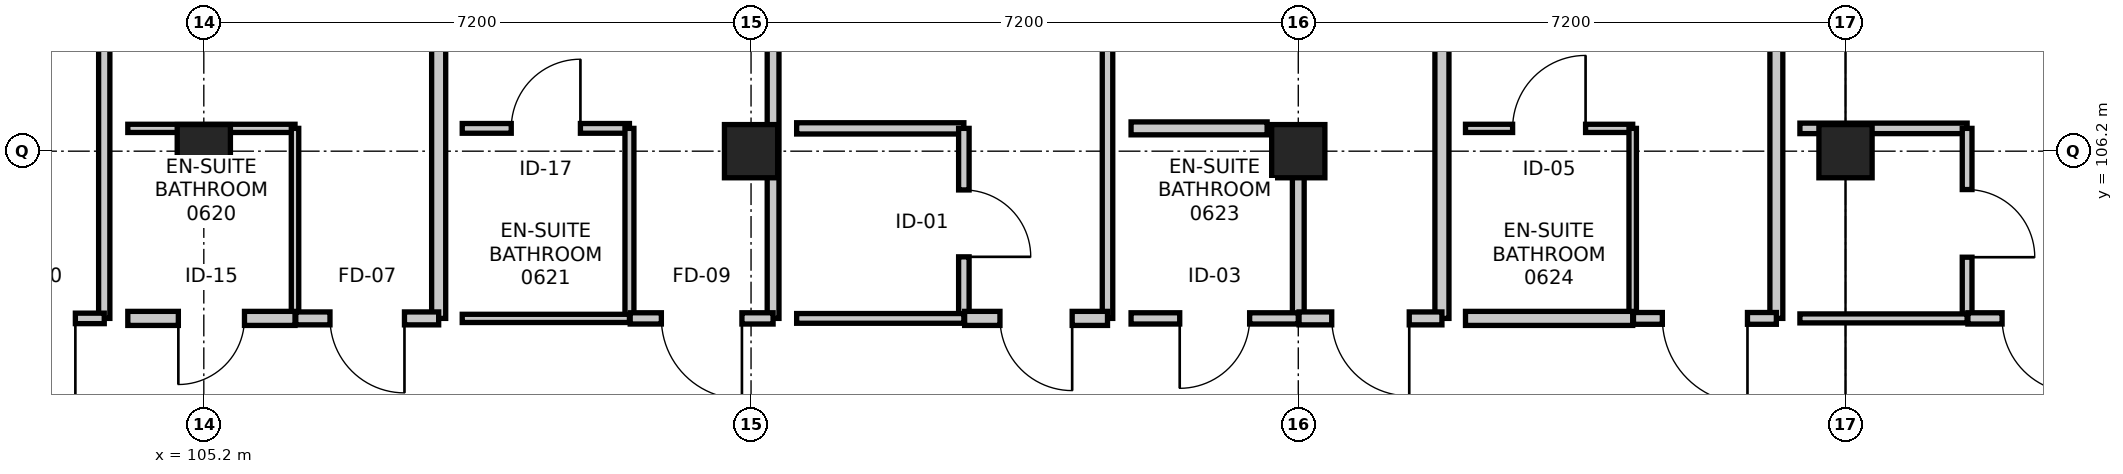
"""IFC4 building model, lengths in metres.
Left out: names, types, materials, properties, quantities, classifications, styles, units other than length and angle.
Written with IfcOpenShell. Run it as: python <this file> out.ifc"""

import sys

from ifc_helpers import new_model, si_unit, direction, frame, frame_2d, origin, origin_2d, place, context, subcontext, project, spatial, rectangle, extrude, element, fill, save


model = new_model("IFC4")
c1 = context("Model", 3, precision=1e-05, world=origin(), true_north=direction((0.0, 1.0)))
c2 = subcontext(c1, "Body", "Model", "MODEL_VIEW")
j1 = project(units=[si_unit("LENGTHUNIT", "METRE"), si_unit("PLANEANGLEUNIT", "RADIAN")], contexts=[c1])
p1 = place(None, origin())
s1 = spatial("IfcSite", under=j1, at=p1, CompositionType="ELEMENT")
p2 = place(p1, origin())
s2 = spatial("IfcBuilding", under=s1, at=p2, CompositionType="ELEMENT")
p3 = place(p2, frame((0.0, 0.0, 26.4)))
s3 = spatial("IfcBuildingStorey", under=s2, at=p3, CompositionType="ELEMENT", Elevation=26.4)
for number, where, z_axis, x_axis in (
    (1, (105.2, 106.2, 0.0), (0.0, 0.0, 1.0), (1.0, 0.0, 0.0)),
    (2, (112.4, 106.2, 0.0), (0.0, 0.0, 1.0), (1.0, 0.0, 0.0)),
    (3, (119.6, 106.2, 0.0), (0.0, 0.0, 1.0), (1.0, 0.0, 0.0)),
    (4, (126.8, 106.2, 0.0), (0.0, 0.0, 1.0), (1.0, 0.0, 0.0)),
):
    element("IfcColumn", number, at=place(p3, frame(where, z_axis=z_axis, x_axis=x_axis)), inside=s3, PredefinedType="COLUMN", context=c2, shape_type="SweptSolid", body=[
        extrude(rectangle(XDim=0.7, YDim=0.7, at=origin_2d()), origin(), (0.0, 0.0, 1.0), 3.6),
    ])
p4 = place(p3, frame((103.89, 116.101, 0.0), z_axis=(0.0, 0.0, 1.0), x_axis=(0.0, -1.0, 0.0)))
e5 = element("IfcWall", 5, at=p4, inside=s3, PredefinedType="PARTITIONING", context=c2, shape_type="SweptSolid", body=[
    extrude(rectangle(XDim=12.101, YDim=0.148, at=frame_2d((6.051, 0.0))), origin(), (0.0, 0.0, 1.0), 2.735),
])
p5 = place(p3, frame((103.89, 104.0, 0.0), z_axis=(0.0, 0.0, 1.0), x_axis=(-1.0, 0.0, 0.0)))
e6 = element("IfcWall", 6, at=p5, inside=s3, PredefinedType="PARTITIONING", context=c2, shape_type="SweptSolid", body=[
    extrude(rectangle(XDim=1.88, YDim=0.138, at=frame_2d((0.94, 0.0))), origin(), (0.0, 0.0, 1.0), 3.35),
])
p6 = place(p5, frame((0.38, 0.0, 0.0)))
e7 = element("IfcOpeningElement", 7, at=p6, cuts=e6, PredefinedType="OPENING", context=c2, shape_type="SweptSolid", body=[
    extrude(rectangle(XDim=1.12, YDim=2.2, at=frame_2d((0.56, 1.1))), frame((0.0, 0.079, 0.0), z_axis=(0.0, -1.0, 0.0), x_axis=(1.0, 0.0, 0.0)), (0.0, 0.0, 1.0), 0.158),
])
p7 = place(p3, frame((104.2, 106.5, 0.0), z_axis=(0.0, 0.0, 1.0), x_axis=(1.0, 0.0, 0.0)))
e8 = element("IfcWall", 8, at=p7, inside=s3, PredefinedType="PARTITIONING", context=c2, shape_type="SweptSolid", body=[
    extrude(rectangle(XDim=2.2, YDim=0.108, at=frame_2d((1.1, 0.0))), origin(), (0.0, 0.0, 1.0), 2.685),
])
p8 = place(p3, frame((106.4, 106.5, 0.0), z_axis=(0.0, 0.0, 1.0), x_axis=(0.0, -1.0, 0.0)))
e9 = element("IfcWall", 9, at=p8, inside=s3, PredefinedType="PARTITIONING", context=c2, shape_type="SweptSolid", body=[
    extrude(rectangle(XDim=2.5, YDim=0.098, at=frame_2d((1.25, 0.0))), origin(), (0.0, 0.0, 1.0), 2.735),
])
p9 = place(p3, frame((106.4, 104.0, 0.0), z_axis=(0.0, 0.0, 1.0), x_axis=(-1.0, 0.0, 0.0)))
e10 = element("IfcWall", 10, at=p9, inside=s3, PredefinedType="PARTITIONING", context=c2, shape_type="SweptSolid", body=[
    extrude(rectangle(XDim=2.2, YDim=0.185, at=frame_2d((1.1, 0.0))), origin(), (0.0, 0.0, 1.0), 2.685),
])
p10 = place(p9, frame((0.665, 0.0, 0.0)))
e11 = element("IfcOpeningElement", 11, at=p10, cuts=e10, PredefinedType="OPENING", context=c2, shape_type="SweptSolid", body=[
    extrude(rectangle(XDim=0.87, YDim=2.07, at=frame_2d((0.435, 1.035))), frame((0.0, 0.103, 0.0), z_axis=(0.0, -1.0, 0.0), x_axis=(1.0, 0.0, 0.0)), (0.0, 0.0, 1.0), 0.205),
])
p11 = place(p3, frame((108.29, 116.006, 0.0), z_axis=(0.0, 0.0, 1.0), x_axis=(0.0, -1.0, 0.0)))
e12 = element("IfcWall", 12, at=p11, inside=s3, PredefinedType="PARTITIONING", context=c2, shape_type="SweptSolid", body=[
    extrude(rectangle(XDim=12.006, YDim=0.185, at=frame_2d((6.003, 0.0))), origin(), (0.0, 0.0, 1.0), 2.735),
])
p12 = place(p3, frame((108.29, 104.0, 0.0), z_axis=(0.0, 0.0, 1.0), x_axis=(-1.0, 0.0, 0.0)))
e13 = element("IfcWall", 13, at=p12, inside=s3, PredefinedType="PARTITIONING", context=c2, shape_type="SweptSolid", body=[
    extrude(rectangle(XDim=1.88, YDim=0.17, at=frame_2d((0.94, 0.0))), origin(), (0.0, 0.0, 1.0), 3.35),
])
p13 = place(p12, frame((0.45, 0.0, 0.0)))
e14 = element("IfcOpeningElement", 14, at=p13, cuts=e13, PredefinedType="OPENING", context=c2, shape_type="SweptSolid", body=[
    extrude(rectangle(XDim=0.98, YDim=2.15, at=frame_2d((0.49, 1.075))), frame((0.0, 0.095, 0.0), z_axis=(0.0, -1.0, 0.0), x_axis=(1.0, 0.0, 0.0)), (0.0, 0.0, 1.0), 0.19),
])
p14 = place(p3, frame((108.6, 106.5, 0.0), z_axis=(0.0, 0.0, 1.0), x_axis=(1.0, 0.0, 0.0)))
e15 = element("IfcWall", 15, at=p14, inside=s3, PredefinedType="PARTITIONING", context=c2, shape_type="SweptSolid", body=[
    extrude(rectangle(XDim=2.2, YDim=0.128, at=frame_2d((1.1, 0.0))), origin(), (0.0, 0.0, 1.0), 3.35),
])
p15 = place(p14, frame((0.645, 0.0, 0.0)))
e16 = element("IfcOpeningElement", 16, at=p15, cuts=e15, PredefinedType="OPENING", context=c2, shape_type="SweptSolid", body=[
    extrude(rectangle(XDim=0.91, YDim=2.11, at=frame_2d((0.455, 1.055))), frame((0.0, 0.074, 0.0), z_axis=(0.0, -1.0, 0.0), x_axis=(1.0, 0.0, 0.0)), (0.0, 0.0, 1.0), 0.148),
])
p16 = place(p3, frame((110.8, 106.5, 0.0), z_axis=(0.0, 0.0, 1.0), x_axis=(0.0, -1.0, 0.0)))
e17 = element("IfcWall", 17, at=p16, inside=s3, PredefinedType="PARTITIONING", context=c2, shape_type="SweptSolid", body=[
    extrude(rectangle(XDim=2.5, YDim=0.118, at=frame_2d((1.25, 0.0))), origin(), (0.0, 0.0, 1.0), 2.735),
])
p17 = place(p3, frame((110.8, 104.0, 0.0), z_axis=(0.0, 0.0, 1.0), x_axis=(-1.0, 0.0, 0.0)))
e18 = element("IfcWall", 18, at=p17, inside=s3, PredefinedType="PARTITIONING", context=c2, shape_type="SweptSolid", body=[
    extrude(rectangle(XDim=2.2, YDim=0.108, at=frame_2d((1.1, 0.0))), origin(), (0.0, 0.0, 1.0), 3.35),
])
p18 = place(p3, frame((112.69, 115.502, 0.0), z_axis=(0.0, 0.0, 1.0), x_axis=(0.0, -1.0, 0.0)))
e19 = element("IfcWall", 19, at=p18, inside=s3, PredefinedType="PARTITIONING", context=c2, shape_type="SweptSolid", body=[
    extrude(rectangle(XDim=11.502, YDim=0.155, at=frame_2d((5.751, 0.0))), origin(), (0.0, 0.0, 1.0), 2.685),
])
p19 = place(p3, frame((112.69, 104.0, 0.0), z_axis=(0.0, 0.0, 1.0), x_axis=(-1.0, 0.0, 0.0)))
e20 = element("IfcWall", 20, at=p19, inside=s3, PredefinedType="PARTITIONING", context=c2, shape_type="SweptSolid", body=[
    extrude(rectangle(XDim=1.88, YDim=0.148, at=frame_2d((0.94, 0.0))), origin(), (0.0, 0.0, 1.0), 2.685),
])
p20 = place(p19, frame((0.41, 0.0, 0.0)))
e21 = element("IfcOpeningElement", 21, at=p20, cuts=e20, PredefinedType="OPENING", context=c2, shape_type="SweptSolid", body=[
    extrude(rectangle(XDim=1.06, YDim=2.2, at=frame_2d((0.53, 1.1))), frame((0.0, 0.084, 0.0), z_axis=(0.0, -1.0, 0.0), x_axis=(1.0, 0.0, 0.0)), (0.0, 0.0, 1.0), 0.168),
])
p21 = place(p3, frame((113.0, 106.5, 0.0), z_axis=(0.0, 0.0, 1.0), x_axis=(1.0, 0.0, 0.0)))
e22 = element("IfcWall", 22, at=p21, inside=s3, PredefinedType="PARTITIONING", context=c2, shape_type="SweptSolid", body=[
    extrude(rectangle(XDim=2.2, YDim=0.148, at=frame_2d((1.1, 0.0))), origin(), (0.0, 0.0, 1.0), 3.35),
])
p22 = place(p3, frame((115.2, 106.5, 0.0), z_axis=(0.0, 0.0, 1.0), x_axis=(0.0, -1.0, 0.0)))
e23 = element("IfcWall", 23, at=p22, inside=s3, PredefinedType="PARTITIONING", context=c2, shape_type="SweptSolid", body=[
    extrude(rectangle(XDim=2.5, YDim=0.138, at=frame_2d((1.25, 0.0))), origin(), (0.0, 0.0, 1.0), 2.735),
])
p23 = place(p22, frame((0.81, 0.0, 0.0)))
e24 = element("IfcOpeningElement", 24, at=p23, cuts=e23, PredefinedType="OPENING", context=c2, shape_type="SweptSolid", body=[
    extrude(rectangle(XDim=0.88, YDim=2.06, at=frame_2d((0.44, 1.03))), frame((0.0, 0.079, 0.0), z_axis=(0.0, -1.0, 0.0), x_axis=(1.0, 0.0, 0.0)), (0.0, 0.0, 1.0), 0.158),
])
p24 = place(p3, frame((115.2, 104.0, 0.0), z_axis=(0.0, 0.0, 1.0), x_axis=(-1.0, 0.0, 0.0)))
e25 = element("IfcWall", 25, at=p24, inside=s3, PredefinedType="PARTITIONING", context=c2, shape_type="SweptSolid", body=[
    extrude(rectangle(XDim=2.2, YDim=0.128, at=frame_2d((1.1, 0.0))), origin(), (0.0, 0.0, 1.0), 3.35),
])
p25 = place(p3, frame((117.09, 115.674, 0.0), z_axis=(0.0, 0.0, 1.0), x_axis=(0.0, -1.0, 0.0)))
e26 = element("IfcWall", 26, at=p25, inside=s3, PredefinedType="PARTITIONING", context=c2, shape_type="SweptSolid", body=[
    extrude(rectangle(XDim=11.674, YDim=0.138, at=frame_2d((5.837, 0.0))), origin(), (0.0, 0.0, 1.0), 2.735),
])
p26 = place(p3, frame((117.09, 104.0, 0.0), z_axis=(0.0, 0.0, 1.0), x_axis=(-1.0, 0.0, 0.0)))
e27 = element("IfcWall", 27, at=p26, inside=s3, PredefinedType="PARTITIONING", context=c2, shape_type="SweptSolid", body=[
    extrude(rectangle(XDim=1.88, YDim=0.185, at=frame_2d((0.94, 0.0))), origin(), (0.0, 0.0, 1.0), 3.35),
])
p27 = place(p26, frame((0.465, 0.0, 0.0)))
e28 = element("IfcOpeningElement", 28, at=p27, cuts=e27, PredefinedType="OPENING", context=c2, shape_type="SweptSolid", body=[
    extrude(rectangle(XDim=0.95, YDim=2.1, at=frame_2d((0.475, 1.05))), frame((0.0, 0.103, 0.0), z_axis=(0.0, -1.0, 0.0), x_axis=(1.0, 0.0, 0.0)), (0.0, 0.0, 1.0), 0.205),
])
p28 = place(p3, frame((117.4, 106.5, 0.0), z_axis=(0.0, 0.0, 1.0), x_axis=(1.0, 0.0, 0.0)))
e29 = element("IfcWall", 29, at=p28, inside=s3, PredefinedType="PARTITIONING", context=c2, shape_type="SweptSolid", body=[
    extrude(rectangle(XDim=1.79, YDim=0.17, at=frame_2d((0.895, 0.0))), origin(), (0.0, 0.0, 1.0), 2.735),
])
p29 = place(p3, frame((119.6, 106.09, 0.0), z_axis=(0.0, 0.0, 1.0), x_axis=(0.0, -1.0, 0.0)))
e30 = element("IfcWall", 30, at=p29, inside=s3, PredefinedType="PARTITIONING", context=c2, shape_type="SweptSolid", body=[
    extrude(rectangle(XDim=2.09, YDim=0.155, at=frame_2d((1.045, 0.0))), origin(), (0.0, 0.0, 1.0), 2.685),
])
p30 = place(p3, frame((119.6, 104.0, 0.0), z_axis=(0.0, 0.0, 1.0), x_axis=(-1.0, 0.0, 0.0)))
e31 = element("IfcWall", 31, at=p30, inside=s3, PredefinedType="PARTITIONING", context=c2, shape_type="SweptSolid", body=[
    extrude(rectangle(XDim=2.2, YDim=0.148, at=frame_2d((1.1, 0.0))), origin(), (0.0, 0.0, 1.0), 2.685),
])
p31 = place(p30, frame((0.64, 0.0, 0.0)))
e32 = element("IfcOpeningElement", 32, at=p31, cuts=e31, PredefinedType="OPENING", context=c2, shape_type="SweptSolid", body=[
    extrude(rectangle(XDim=0.92, YDim=2.1, at=frame_2d((0.46, 1.05))), frame((0.0, 0.084, 0.0), z_axis=(0.0, -1.0, 0.0), x_axis=(1.0, 0.0, 0.0)), (0.0, 0.0, 1.0), 0.168),
])
p32 = place(p3, frame((121.49, 115.444, 0.0), z_axis=(0.0, 0.0, 1.0), x_axis=(0.0, -1.0, 0.0)))
e33 = element("IfcWall", 33, at=p32, inside=s3, PredefinedType="PARTITIONING", context=c2, shape_type="SweptSolid", body=[
    extrude(rectangle(XDim=11.444, YDim=0.185, at=frame_2d((5.722, 0.0))), origin(), (0.0, 0.0, 1.0), 2.735),
])
p33 = place(p3, frame((121.49, 104.0, 0.0), z_axis=(0.0, 0.0, 1.0), x_axis=(-1.0, 0.0, 0.0)))
e34 = element("IfcWall", 34, at=p33, inside=s3, PredefinedType="PARTITIONING", context=c2, shape_type="SweptSolid", body=[
    extrude(rectangle(XDim=1.88, YDim=0.17, at=frame_2d((0.94, 0.0))), origin(), (0.0, 0.0, 1.0), 2.685),
])
p34 = place(p33, frame((0.43, 0.0, 0.0)))
e35 = element("IfcOpeningElement", 35, at=p34, cuts=e34, PredefinedType="OPENING", context=c2, shape_type="SweptSolid", body=[
    extrude(rectangle(XDim=1.02, YDim=2.15, at=frame_2d((0.51, 1.075))), frame((0.0, 0.095, 0.0), z_axis=(0.0, -1.0, 0.0), x_axis=(1.0, 0.0, 0.0)), (0.0, 0.0, 1.0), 0.19),
])
p35 = place(p3, frame((121.8, 106.5, 0.0), z_axis=(0.0, 0.0, 1.0), x_axis=(1.0, 0.0, 0.0)))
e36 = element("IfcWall", 36, at=p35, inside=s3, PredefinedType="PARTITIONING", context=c2, shape_type="SweptSolid", body=[
    extrude(rectangle(XDim=2.2, YDim=0.108, at=frame_2d((1.1, 0.0))), origin(), (0.0, 0.0, 1.0), 3.35),
])
p36 = place(p35, frame((0.62, 0.0, 0.0)))
e37 = element("IfcOpeningElement", 37, at=p36, cuts=e36, PredefinedType="OPENING", context=c2, shape_type="SweptSolid", body=[
    extrude(rectangle(XDim=0.96, YDim=2.14, at=frame_2d((0.48, 1.07))), frame((0.0, 0.064, 0.0), z_axis=(0.0, -1.0, 0.0), x_axis=(1.0, 0.0, 0.0)), (0.0, 0.0, 1.0), 0.128),
])
p37 = place(p3, frame((124.0, 106.5, 0.0), z_axis=(0.0, 0.0, 1.0), x_axis=(0.0, -1.0, 0.0)))
e38 = element("IfcWall", 38, at=p37, inside=s3, PredefinedType="PARTITIONING", context=c2, shape_type="SweptSolid", body=[
    extrude(rectangle(XDim=2.5, YDim=0.098, at=frame_2d((1.25, 0.0))), origin(), (0.0, 0.0, 1.0), 2.735),
])
p38 = place(p3, frame((124.0, 104.0, 0.0), z_axis=(0.0, 0.0, 1.0), x_axis=(-1.0, 0.0, 0.0)))
e39 = element("IfcWall", 39, at=p38, inside=s3, PredefinedType="PARTITIONING", context=c2, shape_type="SweptSolid", body=[
    extrude(rectangle(XDim=2.2, YDim=0.185, at=frame_2d((1.1, 0.0))), origin(), (0.0, 0.0, 1.0), 3.35),
])
p39 = place(p3, frame((125.89, 115.181, 0.0), z_axis=(0.0, 0.0, 1.0), x_axis=(0.0, -1.0, 0.0)))
e40 = element("IfcWall", 40, at=p39, inside=s3, PredefinedType="PARTITIONING", context=c2, shape_type="SweptSolid", body=[
    extrude(rectangle(XDim=11.181, YDim=0.17, at=frame_2d((5.591, 0.0))), origin(), (0.0, 0.0, 1.0), 2.735),
])
p40 = place(p3, frame((125.89, 104.0, 0.0), z_axis=(0.0, 0.0, 1.0), x_axis=(-1.0, 0.0, 0.0)))
e41 = element("IfcWall", 41, at=p40, inside=s3, PredefinedType="PARTITIONING", context=c2, shape_type="SweptSolid", body=[
    extrude(rectangle(XDim=1.88, YDim=0.155, at=frame_2d((0.94, 0.0))), origin(), (0.0, 0.0, 1.0), 3.35),
])
p41 = place(p40, frame((0.38, 0.0, 0.0)))
e42 = element("IfcOpeningElement", 42, at=p41, cuts=e41, PredefinedType="OPENING", context=c2, shape_type="SweptSolid", body=[
    extrude(rectangle(XDim=1.12, YDim=2.2, at=frame_2d((0.56, 1.1))), frame((0.0, 0.087, 0.0), z_axis=(0.0, -1.0, 0.0), x_axis=(1.0, 0.0, 0.0)), (0.0, 0.0, 1.0), 0.175),
])
p42 = place(p3, frame((126.2, 106.5, 0.0), z_axis=(0.0, 0.0, 1.0), x_axis=(1.0, 0.0, 0.0)))
e43 = element("IfcWall", 43, at=p42, inside=s3, PredefinedType="PARTITIONING", context=c2, shape_type="SweptSolid", body=[
    extrude(rectangle(XDim=2.2, YDim=0.138, at=frame_2d((1.1, 0.0))), origin(), (0.0, 0.0, 1.0), 2.685),
])
p43 = place(p3, frame((128.4, 106.5, 0.0), z_axis=(0.0, 0.0, 1.0), x_axis=(0.0, -1.0, 0.0)))
e44 = element("IfcWall", 44, at=p43, inside=s3, PredefinedType="PARTITIONING", context=c2, shape_type="SweptSolid", body=[
    extrude(rectangle(XDim=2.5, YDim=0.128, at=frame_2d((1.25, 0.0))), origin(), (0.0, 0.0, 1.0), 2.735),
])
p44 = place(p43, frame((0.805, 0.0, 0.0)))
e45 = element("IfcOpeningElement", 45, at=p44, cuts=e44, PredefinedType="OPENING", context=c2, shape_type="SweptSolid", body=[
    extrude(rectangle(XDim=0.89, YDim=2.09, at=frame_2d((0.445, 1.045))), frame((0.0, 0.074, 0.0), z_axis=(0.0, -1.0, 0.0), x_axis=(1.0, 0.0, 0.0)), (0.0, 0.0, 1.0), 0.148),
])
p45 = place(p3, frame((128.4, 104.0, 0.0), z_axis=(0.0, 0.0, 1.0), x_axis=(-1.0, 0.0, 0.0)))
e46 = element("IfcWall", 46, at=p45, inside=s3, PredefinedType="PARTITIONING", context=c2, shape_type="SweptSolid", body=[
    extrude(rectangle(XDim=2.2, YDim=0.118, at=frame_2d((1.1, 0.0))), origin(), (0.0, 0.0, 1.0), 2.685),
])
p46 = place(p3, frame((130.29, 104.0, 0.0), z_axis=(0.0, 0.0, 1.0), x_axis=(-1.0, 0.0, 0.0)))
e47 = element("IfcWall", 47, at=p46, inside=s3, PredefinedType="PARTITIONING", context=c2, shape_type="SweptSolid", body=[
    extrude(rectangle(XDim=1.88, YDim=0.148, at=frame_2d((0.94, 0.0))), origin(), (0.0, 0.0, 1.0), 3.35),
])
p47 = place(p46, frame((0.45, 0.0, 0.0)))
e48 = element("IfcOpeningElement", 48, at=p47, cuts=e47, PredefinedType="OPENING", context=c2, shape_type="SweptSolid", body=[
    extrude(rectangle(XDim=0.98, YDim=2.15, at=frame_2d((0.49, 1.075))), frame((0.0, 0.084, 0.0), z_axis=(0.0, -1.0, 0.0), x_axis=(1.0, 0.0, 0.0)), (0.0, 0.0, 1.0), 0.168),
])
p48 = place(p6, origin())
e49 = element("IfcDoor", 49, at=p48, inside=s3, OperationType="SINGLE_SWING_LEFT", PredefinedType="DOOR", context=c2, shape_type="SweptSolid", body=[
    extrude(rectangle(XDim=1.12, YDim=2.2, at=frame_2d((0.56, 1.1))), frame((0.0, 0.025, 0.0), z_axis=(0.0, -1.0, 0.0), x_axis=(1.0, 0.0, 0.0)), (0.0, 0.0, 1.0), 0.05),
])
fill(e7, e49)
p49 = place(p10, origin())
e50 = element("IfcDoor", 50, at=p49, inside=s3, OperationType="SINGLE_SWING_RIGHT", PredefinedType="DOOR", context=c2, shape_type="SweptSolid", body=[
    extrude(rectangle(XDim=0.87, YDim=2.07, at=frame_2d((0.435, 1.035))), frame((0.0, 0.025, 0.0), z_axis=(0.0, -1.0, 0.0), x_axis=(1.0, 0.0, 0.0)), (0.0, 0.0, 1.0), 0.05),
])
fill(e11, e50)
p50 = place(p13, origin())
e51 = element("IfcDoor", 51, at=p50, inside=s3, OperationType="SINGLE_SWING_LEFT", PredefinedType="DOOR", context=c2, shape_type="SweptSolid", body=[
    extrude(rectangle(XDim=0.98, YDim=2.15, at=frame_2d((0.49, 1.075))), frame((0.0, 0.025, 0.0), z_axis=(0.0, -1.0, 0.0), x_axis=(1.0, 0.0, 0.0)), (0.0, 0.0, 1.0), 0.05),
])
fill(e14, e51)
p51 = place(p15, origin())
e52 = element("IfcDoor", 52, at=p51, inside=s3, OperationType="SINGLE_SWING_RIGHT", PredefinedType="DOOR", context=c2, shape_type="SweptSolid", body=[
    extrude(rectangle(XDim=0.91, YDim=2.11, at=frame_2d((0.455, 1.055))), frame((0.0, 0.025, 0.0), z_axis=(0.0, -1.0, 0.0), x_axis=(1.0, 0.0, 0.0)), (0.0, 0.0, 1.0), 0.05),
])
fill(e16, e52)
p52 = place(p20, origin())
e53 = element("IfcDoor", 53, at=p52, inside=s3, OperationType="SINGLE_SWING_LEFT", PredefinedType="DOOR", context=c2, shape_type="SweptSolid", body=[
    extrude(rectangle(XDim=1.06, YDim=2.2, at=frame_2d((0.53, 1.1))), frame((0.0, 0.025, 0.0), z_axis=(0.0, -1.0, 0.0), x_axis=(1.0, 0.0, 0.0)), (0.0, 0.0, 1.0), 0.05),
])
fill(e21, e53)
p53 = place(p23, origin())
e54 = element("IfcDoor", 54, at=p53, inside=s3, OperationType="SINGLE_SWING_RIGHT", PredefinedType="DOOR", context=c2, shape_type="SweptSolid", body=[
    extrude(rectangle(XDim=0.88, YDim=2.06, at=frame_2d((0.44, 1.03))), frame((0.0, 0.025, 0.0), z_axis=(0.0, -1.0, 0.0), x_axis=(1.0, 0.0, 0.0)), (0.0, 0.0, 1.0), 0.05),
])
fill(e24, e54)
p54 = place(p27, origin())
e55 = element("IfcDoor", 55, at=p54, inside=s3, OperationType="SINGLE_SWING_LEFT", PredefinedType="DOOR", context=c2, shape_type="SweptSolid", body=[
    extrude(rectangle(XDim=0.95, YDim=2.1, at=frame_2d((0.475, 1.05))), frame((0.0, 0.025, 0.0), z_axis=(0.0, -1.0, 0.0), x_axis=(1.0, 0.0, 0.0)), (0.0, 0.0, 1.0), 0.05),
])
fill(e28, e55)
p55 = place(p31, origin())
e56 = element("IfcDoor", 56, at=p55, inside=s3, OperationType="SINGLE_SWING_RIGHT", PredefinedType="DOOR", context=c2, shape_type="SweptSolid", body=[
    extrude(rectangle(XDim=0.92, YDim=2.1, at=frame_2d((0.46, 1.05))), frame((0.0, 0.025, 0.0), z_axis=(0.0, -1.0, 0.0), x_axis=(1.0, 0.0, 0.0)), (0.0, 0.0, 1.0), 0.05),
])
fill(e32, e56)
p56 = place(p34, origin())
e57 = element("IfcDoor", 57, at=p56, inside=s3, OperationType="SINGLE_SWING_LEFT", PredefinedType="DOOR", context=c2, shape_type="SweptSolid", body=[
    extrude(rectangle(XDim=1.02, YDim=2.15, at=frame_2d((0.51, 1.075))), frame((0.0, 0.025, 0.0), z_axis=(0.0, -1.0, 0.0), x_axis=(1.0, 0.0, 0.0)), (0.0, 0.0, 1.0), 0.05),
])
fill(e35, e57)
p57 = place(p36, origin())
e58 = element("IfcDoor", 58, at=p57, inside=s3, OperationType="SINGLE_SWING_RIGHT", PredefinedType="DOOR", context=c2, shape_type="SweptSolid", body=[
    extrude(rectangle(XDim=0.96, YDim=2.14, at=frame_2d((0.48, 1.07))), frame((0.0, 0.025, 0.0), z_axis=(0.0, -1.0, 0.0), x_axis=(1.0, 0.0, 0.0)), (0.0, 0.0, 1.0), 0.05),
])
fill(e37, e58)
p58 = place(p41, origin())
e59 = element("IfcDoor", 59, at=p58, inside=s3, OperationType="SINGLE_SWING_LEFT", PredefinedType="DOOR", context=c2, shape_type="SweptSolid", body=[
    extrude(rectangle(XDim=1.12, YDim=2.2, at=frame_2d((0.56, 1.1))), frame((0.0, 0.025, 0.0), z_axis=(0.0, -1.0, 0.0), x_axis=(1.0, 0.0, 0.0)), (0.0, 0.0, 1.0), 0.05),
])
fill(e42, e59)
p59 = place(p44, origin())
e60 = element("IfcDoor", 60, at=p59, inside=s3, OperationType="SINGLE_SWING_RIGHT", PredefinedType="DOOR", context=c2, shape_type="SweptSolid", body=[
    extrude(rectangle(XDim=0.89, YDim=2.09, at=frame_2d((0.445, 1.045))), frame((0.0, 0.025, 0.0), z_axis=(0.0, -1.0, 0.0), x_axis=(1.0, 0.0, 0.0)), (0.0, 0.0, 1.0), 0.05),
])
fill(e45, e60)
p60 = place(p47, origin())
e61 = element("IfcDoor", 61, at=p60, inside=s3, OperationType="SINGLE_SWING_LEFT", PredefinedType="DOOR", context=c2, shape_type="SweptSolid", body=[
    extrude(rectangle(XDim=0.98, YDim=2.15, at=frame_2d((0.49, 1.075))), frame((0.0, 0.025, 0.0), z_axis=(0.0, -1.0, 0.0), x_axis=(1.0, 0.0, 0.0)), (0.0, 0.0, 1.0), 0.05),
])
fill(e48, e61)
save(model, sys.argv[1])
